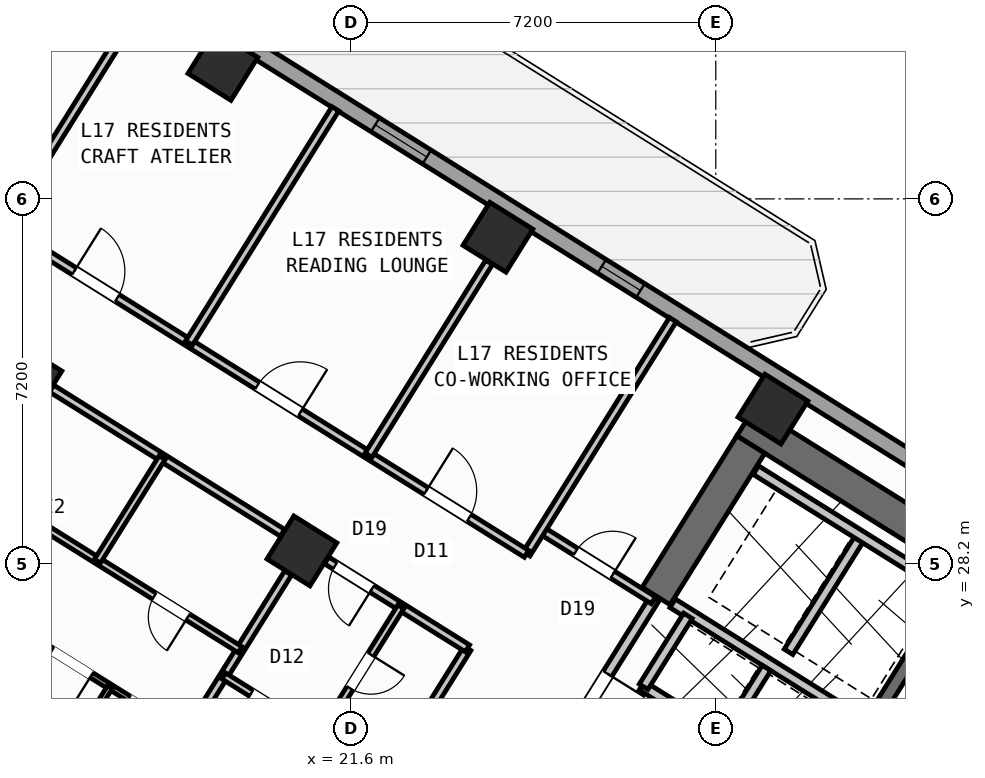
"""IFC4 building model, lengths in metres.
Left out: names, types, materials, properties, quantities, classifications, styles, units other than length and angle.
Written with IfcOpenShell. Run it as: python <this file> out.ifc"""

import sys

from ifc_helpers import new_model, si_unit, direction, frame, frame_2d, origin, origin_2d, place, context, subcontext, project, spatial, rectangle, hollow_rectangle, extrude, source, transform, mapped, element, fill, save


model = new_model("IFC4")
c1 = context("Model", 3, precision=1e-05, world=origin(), true_north=direction((0.0, 1.0)))
c2 = subcontext(c1, "Body", "Model", "MODEL_VIEW")
j1 = project(units=[si_unit("LENGTHUNIT", "METRE"), si_unit("PLANEANGLEUNIT", "RADIAN")], contexts=[c1])
p1 = place(None, origin())
s1 = spatial("IfcSite", under=j1, at=p1, CompositionType="ELEMENT")
p2 = place(p1, origin())
s2 = spatial("IfcBuilding", under=s1, at=p2, CompositionType="ELEMENT")
p3 = place(p2, frame((0.0, 0.0, 67.2)))
s3 = spatial("IfcBuildingStorey", under=s2, at=p3, CompositionType="ELEMENT", Elevation=67.2)
p4 = place(p3, frame((40.615, 23.983, 0.0), z_axis=(0.0, 0.0, 1.0), x_axis=(-0.848045953968, 0.529922692436, 0.0)))
e1 = element("IfcWall", 1, at=p4, inside=s3, PredefinedType="SHEAR", context=c2, shape_type="SweptSolid", body=[
    extrude(rectangle(XDim=13.24, YDim=0.65, at=frame_2d((6.62, 0.0))), origin(), (0.0, 0.0, 1.0), 4.22),
])
p5 = place(p3, frame((29.491, 30.552, 0.0), z_axis=(0.0, 0.0, 1.0), x_axis=(-0.529893103397, -0.8480644427, 0.0)))
e2 = element("IfcWall", 2, at=p5, inside=s3, PredefinedType="SHEAR", context=c2, shape_type="SweptSolid", body=[
    extrude(rectangle(XDim=3.525, YDim=0.65, at=frame_2d((1.763, 0.0))), origin(), (0.0, 0.0, 1.0), 4.22),
])
m1 = source(origin(), c2, "Body", "SweptSolid", [
    extrude(hollow_rectangle(XDim=1.0, YDim=1.0, WallThickness=0.04, at=origin_2d()), origin(), (0.0, 0.0, 1.0), 4.5),
])
for number, where, z_axis, x_axis in (
    (3, (29.928, 31.251, 0.0), (0.0, 0.0, 1.0), (-0.848, 0.53, 0.0)),
    (4, (24.5, 34.643, 0.0), (0.0, 0.0, 1.0), (-0.848, 0.53, 0.0)),
    (5, (20.632, 28.452, 0.0), (0.0, 0.0, 1.0), (-0.848, 0.53, 0.0)),
    (6, (19.073, 38.034, 0.0), (0.0, 0.0, 1.0), (-0.848, 0.53, 0.0)),
    (7, (15.205, 31.844, 0.0), (0.0, 0.0, 1.0), (-0.848, 0.53, 0.0)),
):
    element("IfcColumn", number, at=place(p3, frame(where, z_axis=z_axis, x_axis=x_axis)), inside=s3, PredefinedType="COLUMN", context=c2, shape_type="MappedRepresentation", body=[
        mapped(m1, transform((0.0, 0.0, 0.0), scale=1.0)),
    ])
p6 = place(p3, frame((14.138, 41.825, 0.0), z_axis=(0.0, 0.0, 1.0), x_axis=(0.848046498049, -0.529921821731, 0.0)))
e8 = element("IfcWall", 8, at=p6, inside=s3, PredefinedType="STANDARD", context=c2, shape_type="SweptSolid", body=[
    extrude(rectangle(XDim=31.588, YDim=0.32, at=frame_2d((15.794, 0.0))), origin(), (0.0, 0.0, 1.0), 4.22),
])
p7 = place(p6, frame((2.526, 0.0, 0.0)))
e9 = element("IfcOpeningElement", 9, at=p7, cuts=e8, PredefinedType="OPENING", context=c2, shape_type="SweptSolid", body=[
    extrude(rectangle(XDim=1.05, YDim=2.15, at=frame_2d((0.525, 1.075))), frame((0.0, 0.17, 0.0), z_axis=(0.0, -1.0, 0.0), x_axis=(1.0, 0.0, 0.0)), (0.0, 0.0, 1.0), 0.34),
])
p8 = place(p6, frame((9.364, 0.0, 0.95)))
e10 = element("IfcOpeningElement", 10, at=p8, cuts=e8, PredefinedType="OPENING", context=c2, shape_type="SweptSolid", body=[
    extrude(rectangle(XDim=1.2, YDim=1.4, at=frame_2d((0.6, 0.7))), frame((0.0, 0.17, 0.0), z_axis=(0.0, -1.0, 0.0), x_axis=(1.0, 0.0, 0.0)), (0.0, 0.0, 1.0), 0.34),
])
p9 = place(p6, frame((14.636, 0.0, 1.0)))
e11 = element("IfcOpeningElement", 11, at=p9, cuts=e8, PredefinedType="OPENING", context=c2, shape_type="SweptSolid", body=[
    extrude(rectangle(XDim=0.9, YDim=1.25, at=frame_2d((0.45, 0.625))), frame((0.0, 0.17, 0.0), z_axis=(0.0, -1.0, 0.0), x_axis=(1.0, 0.0, 0.0)), (0.0, 0.0, 1.0), 0.34),
])
p10 = place(p6, frame((22.306, 0.0, 0.85)))
e12 = element("IfcOpeningElement", 12, at=p10, cuts=e8, PredefinedType="OPENING", context=c2, shape_type="SweptSolid", body=[
    extrude(rectangle(XDim=1.5, YDim=1.5, at=frame_2d((0.75, 0.75))), frame((0.0, 0.17, 0.0), z_axis=(0.0, -1.0, 0.0), x_axis=(1.0, 0.0, 0.0)), (0.0, 0.0, 1.0), 0.34),
])
p11 = place(p6, frame((26.981, 0.0, 0.85)))
e13 = element("IfcOpeningElement", 13, at=p11, cuts=e8, PredefinedType="OPENING", context=c2, shape_type="SweptSolid", body=[
    extrude(rectangle(XDim=1.5, YDim=1.5, at=frame_2d((0.75, 0.75))), frame((0.0, 0.17, 0.0), z_axis=(0.0, -1.0, 0.0), x_axis=(1.0, 0.0, 0.0)), (0.0, 0.0, 1.0), 0.34),
])
p12 = place(p3, frame((33.496, 27.677, 0.0), z_axis=(0.0, 0.0, 1.0), x_axis=(-0.529908658664, -0.84805472316, 0.0)))
e14 = element("IfcWall", 14, at=p12, inside=s3, PredefinedType="SHEAR", context=c2, shape_type="SweptSolid", body=[
    extrude(rectangle(XDim=3.16, YDim=0.26, at=frame_2d((1.58, 0.0))), origin(), (0.0, 0.0, 1.0), 4.22),
])
p13 = place(p3, frame((31.822, 24.998, 0.0), z_axis=(0.0, 0.0, 1.0), x_axis=(-0.848058348634, 0.529902856485, 0.0)))
e15 = element("IfcWall", 15, at=p13, inside=s3, PredefinedType="STANDARD", context=c2, shape_type="SweptSolid", body=[
    extrude(rectangle(XDim=4.568, YDim=0.2, at=frame_2d((2.284, 0.0))), origin(), (0.0, 0.0, 1.0), 4.21),
])
p14 = place(p3, frame((32.108, 22.814, 0.0), z_axis=(0.0, 0.0, 1.0), x_axis=(-0.848042229521, 0.529928652696, 0.0)))
e16 = element("IfcWall", 16, at=p14, inside=s3, PredefinedType="STANDARD", context=c2, shape_type="SweptSolid", body=[
    extrude(rectangle(XDim=5.62, YDim=0.2, at=frame_2d((2.81, 0.0))), origin(), (0.0, 0.0, 1.0), 4.21),
])
p15 = place(p3, frame((28.25, 27.17, 0.0), z_axis=(0.0, 0.0, 1.0), x_axis=(-0.529905827651, -0.848056492117, 0.0)))
e17 = element("IfcWall", 17, at=p15, inside=s3, PredefinedType="STANDARD", context=c2, shape_type="SweptSolid", body=[
    extrude(rectangle(XDim=1.65, YDim=0.2, at=frame_2d((0.825, 0.0))), origin(), (0.0, 0.0, 1.0), 4.21),
])
p16 = place(p3, frame((31.645, 28.716, 0.0), z_axis=(0.0, 0.0, 1.0), x_axis=(-0.52986693015, -0.848080795876, 0.0)))
e18 = element("IfcWall", 18, at=p16, inside=s3, PredefinedType="STANDARD", context=c2, shape_type="SweptSolid", body=[
    extrude(rectangle(XDim=2.66, YDim=0.2, at=frame_2d((1.33, 0.0))), origin(), (0.0, 0.0, 1.0), 4.21),
])
p17 = place(p3, frame((33.363, 27.69, 0.0), z_axis=(0.0, 0.0, 1.0), x_axis=(-0.848053806312, 0.529910125964, 0.0)))
e19 = element("IfcWall", 19, at=p17, inside=s3, PredefinedType="STANDARD", context=c2, shape_type="SweptSolid", body=[
    extrude(rectangle(XDim=4.448, YDim=0.2, at=frame_2d((2.224, 0.0))), origin(), (0.0, 0.0, 1.0), 4.21),
])
p18 = place(p3, frame((29.801, 26.142, 0.0), z_axis=(0.0, 0.0, 1.0), x_axis=(-0.529998940003, -0.847998304005, 0.0)))
e20 = element("IfcWall", 20, at=p18, inside=s3, PredefinedType="STANDARD", context=c2, shape_type="SweptSolid", body=[
    extrude(rectangle(XDim=1.58, YDim=0.2, at=frame_2d((0.79, 0.0))), origin(), (0.0, 0.0, 1.0), 4.21),
])
p19 = place(p3, frame((27.596, 27.52, 0.0), z_axis=(0.0, 0.0, 1.0), x_axis=(-0.529865479138, -0.848081702443, 0.0)))
e21 = element("IfcWall", 21, at=p19, inside=s3, PredefinedType="STANDARD", context=c2, shape_type="SweptSolid", body=[
    extrude(rectangle(XDim=2.96, YDim=0.2, at=frame_2d((1.48, 0.0))), origin(), (0.0, 0.0, 1.0), 2.395),
])
p20 = place(p19, frame((1.76, 0.0, 0.0)))
e22 = element("IfcOpeningElement", 22, at=p20, cuts=e21, PredefinedType="OPENING", context=c2, shape_type="SweptSolid", body=[
    extrude(rectangle(XDim=0.86, YDim=2.05, at=frame_2d((0.43, 1.025))), frame((0.0, 0.11, 0.0), z_axis=(0.0, -1.0, 0.0), x_axis=(1.0, 0.0, 0.0)), (0.0, 0.0, 1.0), 0.22),
])
p21 = place(p3, frame((27.57, 27.478, 0.0), z_axis=(0.0, 0.0, 1.0), x_axis=(-0.848050851465, 0.529914854792, 0.0)))
e23 = element("IfcWall", 23, at=p21, inside=s3, PredefinedType="PARTITIONING", context=c2, shape_type="SweptSolid", body=[
    extrude(rectangle(XDim=2.61, YDim=0.16, at=frame_2d((1.305, 0.0))), origin(), (0.0, 0.0, 1.0), 4.21),
])
p22 = place(p21, frame((0.95, 0.0, 0.0)))
e24 = element("IfcOpeningElement", 24, at=p22, cuts=e23, PredefinedType="OPENING", context=c2, shape_type="SweptSolid", body=[
    extrude(rectangle(XDim=0.86, YDim=2.05, at=frame_2d((0.43, 1.025))), frame((0.0, 0.09, 0.0), z_axis=(0.0, -1.0, 0.0), x_axis=(1.0, 0.0, 0.0)), (0.0, 0.0, 1.0), 0.18),
])
p23 = place(p3, frame((27.953, 33.016, 0.0), z_axis=(0.0, 0.0, 1.0), x_axis=(-0.529906322364, -0.848056182997, 0.0)))
e25 = element("IfcWall", 25, at=p23, inside=s3, PredefinedType="PARTITIONING", context=c2, shape_type="SweptSolid", body=[
    extrude(rectangle(XDim=5.45, YDim=0.16, at=frame_2d((2.725, 0.0))), origin(), (0.0, 0.0, 1.0), 4.21),
])
p24 = place(p3, frame((23.899, 26.529, 0.0), z_axis=(0.0, 0.0, 1.0), x_axis=(-0.529917716469, -0.848049063305, 0.0)))
e26 = element("IfcWall", 26, at=p24, inside=s3, PredefinedType="PARTITIONING", context=c2, shape_type="SweptSolid", body=[
    extrude(rectangle(XDim=14.05, YDim=0.16, at=frame_2d((7.025, 0.0))), origin(), (0.0, 0.0, 1.0), 4.21),
])
p25 = place(p3, frame((25.065, 28.394, 0.0), z_axis=(0.0, 0.0, 1.0), x_axis=(-0.848048310262, 0.529918921593, 0.0)))
e27 = element("IfcWall", 27, at=p25, inside=s3, PredefinedType="PARTITIONING", context=c2, shape_type="SweptSolid", body=[
    extrude(rectangle(XDim=16.73, YDim=0.16, at=frame_2d((8.365, 0.0))), origin(), (0.0, 0.0, 1.0), 4.21),
])
p26 = place(p25, frame((1.338, 0.0, 0.0)))
e28 = element("IfcOpeningElement", 28, at=p26, cuts=e27, PredefinedType="OPENING", context=c2, shape_type="SweptSolid", body=[
    extrude(rectangle(XDim=1.0, YDim=2.1, at=frame_2d((0.5, 1.05))), frame((0.0, 0.09, 0.0), z_axis=(0.0, -1.0, 0.0), x_axis=(1.0, 0.0, 0.0)), (0.0, 0.0, 1.0), 0.18),
])
p27 = place(p25, frame((5.265, 0.0, 0.0)))
e29 = element("IfcOpeningElement", 29, at=p27, cuts=e27, PredefinedType="OPENING", context=c2, shape_type="SweptSolid", body=[
    extrude(rectangle(XDim=1.0, YDim=2.1, at=frame_2d((0.5, 1.05))), frame((0.0, 0.09, 0.0), z_axis=(0.0, -1.0, 0.0), x_axis=(1.0, 0.0, 0.0)), (0.0, 0.0, 1.0), 0.18),
])
p28 = place(p25, frame((9.526, 0.0, 0.0)))
e30 = element("IfcOpeningElement", 30, at=p28, cuts=e27, PredefinedType="OPENING", context=c2, shape_type="SweptSolid", body=[
    extrude(rectangle(XDim=1.0, YDim=2.1, at=frame_2d((0.5, 1.05))), frame((0.0, 0.09, 0.0), z_axis=(0.0, -1.0, 0.0), x_axis=(1.0, 0.0, 0.0)), (0.0, 0.0, 1.0), 0.18),
])
p29 = place(p25, frame((13.954, 0.0, 0.0)))
e31 = element("IfcOpeningElement", 31, at=p29, cuts=e27, PredefinedType="OPENING", context=c2, shape_type="SweptSolid", body=[
    extrude(rectangle(XDim=1.0, YDim=2.1, at=frame_2d((0.5, 1.05))), frame((0.0, 0.09, 0.0), z_axis=(0.0, -1.0, 0.0), x_axis=(1.0, 0.0, 0.0)), (0.0, 0.0, 1.0), 0.18),
])
p30 = place(p3, frame((23.899, 26.529, 0.0), z_axis=(0.0, 0.0, 1.0), x_axis=(-0.848061058944, 0.529898518871, 0.0)))
e32 = element("IfcWall", 32, at=p30, inside=s3, PredefinedType="PARTITIONING", context=c2, shape_type="SweptSolid", body=[
    extrude(rectangle(XDim=3.278, YDim=0.16, at=frame_2d((1.639, 0.0))), origin(), (0.0, 0.0, 1.0), 3.595),
])
p31 = place(p30, frame((2.22, 0.0, 0.0)))
e33 = element("IfcOpeningElement", 33, at=p31, cuts=e32, PredefinedType="OPENING", context=c2, shape_type="SweptSolid", body=[
    extrude(rectangle(XDim=0.86, YDim=2.05, at=frame_2d((0.43, 1.025))), frame((0.0, 0.09, 0.0), z_axis=(0.0, -1.0, 0.0), x_axis=(1.0, 0.0, 0.0)), (0.0, 0.0, 1.0), 0.18),
])
p32 = place(p3, frame((20.251, 28.808, 0.0), z_axis=(0.0, 0.0, 1.0), x_axis=(-0.848044224181, 0.529925460639, 0.0)))
e34 = element("IfcWall", 34, at=p32, inside=s3, PredefinedType="PARTITIONING", context=c2, shape_type="SweptSolid", body=[
    extrude(rectangle(XDim=5.376, YDim=0.16, at=frame_2d((2.688, 0.0))), origin(), (0.0, 0.0, 1.0), 3.595),
])
p33 = place(p3, frame((20.361, 28.018, 0.0), z_axis=(0.0, 0.0, 1.0), x_axis=(-0.529915015264, -0.848050751193, 0.0)))
e35 = element("IfcWall", 35, at=p33, inside=s3, PredefinedType="PARTITIONING", context=c2, shape_type="SweptSolid", body=[
    extrude(rectangle(XDim=6.276, YDim=0.16, at=frame_2d((3.138, 0.0))), origin(), (0.0, 0.0, 1.0), 2.395),
])
p34 = place(p3, frame((22.304, 23.976, 0.0), z_axis=(0.0, 0.0, 1.0), x_axis=(-0.84803087207, 0.529946827537, 0.0)))
e36 = element("IfcWall", 36, at=p34, inside=s3, PredefinedType="PLUMBINGWALL", context=c2, shape_type="SweptSolid", body=[
    extrude(rectangle(XDim=3.79, YDim=0.14, at=frame_2d((1.895, 0.0))), origin(), (0.0, 0.0, 1.0), 4.21),
])
p35 = place(p34, frame((2.23, 0.0, 0.0)))
e37 = element("IfcOpeningElement", 37, at=p35, cuts=e36, PredefinedType="OPENING", context=c2, shape_type="SweptSolid", body=[
    extrude(rectangle(XDim=0.92, YDim=2.08, at=frame_2d((0.46, 1.04))), frame((0.0, 0.08, 0.0), z_axis=(0.0, -1.0, 0.0), x_axis=(1.0, 0.0, 0.0)), (0.0, 0.0, 1.0), 0.16),
])
p36 = place(p3, frame((22.585, 27.35, 0.0), z_axis=(0.0, 0.0, 1.0), x_axis=(-0.529977067289, -0.848011974059, 0.0)))
e38 = element("IfcWall", 38, at=p36, inside=s3, PredefinedType="PLUMBINGWALL", context=c2, shape_type="SweptSolid", body=[
    extrude(rectangle(XDim=3.01, YDim=0.14, at=frame_2d((1.505, 0.0))), origin(), (0.0, 0.0, 1.0), 3.865),
])
p37 = place(p36, frame((1.115, 0.0, 0.0)))
e39 = element("IfcOpeningElement", 39, at=p37, cuts=e38, PredefinedType="OPENING", context=c2, shape_type="SweptSolid", body=[
    extrude(rectangle(XDim=0.78, YDim=2.05, at=frame_2d((0.39, 1.025))), frame((0.0, 0.08, 0.0), z_axis=(0.0, -1.0, 0.0), x_axis=(1.0, 0.0, 0.0)), (0.0, 0.0, 1.0), 0.16),
])
p38 = place(p3, frame((19.413, 26.501, 0.0), z_axis=(0.0, 0.0, 1.0), x_axis=(-0.848051995289, 0.529913024266, 0.0)))
e40 = element("IfcWall", 40, at=p38, inside=s3, PredefinedType="PLUMBINGWALL", context=c2, shape_type="SweptSolid", body=[
    extrude(rectangle(XDim=8.94, YDim=0.14, at=frame_2d((4.47, 0.0))), origin(), (0.0, 0.0, 1.0), 4.21),
])
p39 = place(p38, frame((5.688, 0.0, 0.0)))
e41 = element("IfcOpeningElement", 41, at=p39, cuts=e40, PredefinedType="OPENING", context=c2, shape_type="SweptSolid", body=[
    extrude(rectangle(XDim=0.78, YDim=2.05, at=frame_2d((0.39, 1.025))), frame((0.0, 0.08, 0.0), z_axis=(0.0, -1.0, 0.0), x_axis=(1.0, 0.0, 0.0)), (0.0, 0.0, 1.0), 0.16),
])
p40 = place(p38, frame((1.218, 0.0, 0.0)))
e42 = element("IfcOpeningElement", 42, at=p40, cuts=e40, PredefinedType="OPENING", context=c2, shape_type="SweptSolid", body=[
    extrude(rectangle(XDim=0.78, YDim=2.05, at=frame_2d((0.39, 1.025))), frame((0.0, 0.08, 0.0), z_axis=(0.0, -1.0, 0.0), x_axis=(1.0, 0.0, 0.0)), (0.0, 0.0, 1.0), 0.16),
])
p41 = place(p3, frame((17.874, 30.294, 0.0), z_axis=(0.0, 0.0, 1.0), x_axis=(-0.52988967038, -0.848066587731, 0.0)))
e43 = element("IfcWall", 43, at=p41, inside=s3, PredefinedType="PLUMBINGWALL", context=c2, shape_type="SweptSolid", body=[
    extrude(rectangle(XDim=2.41, YDim=0.14, at=frame_2d((1.205, 0.0))), origin(), (0.0, 0.0, 1.0), 4.21),
])
p42 = place(p3, frame((18.364, 24.823, 0.0), z_axis=(0.0, 0.0, 1.0), x_axis=(-0.848056599187, 0.529905656296, 0.0)))
e44 = element("IfcWall", 44, at=p42, inside=s3, PredefinedType="PARTITIONING", context=c2, shape_type="SweptSolid", body=[
    extrude(rectangle(XDim=8.94, YDim=0.11, at=frame_2d((4.47, 0.0))), origin(), (0.0, 0.0, 1.0), 4.21),
])
p43 = place(p42, frame((0.434, 0.0, 0.0)))
e45 = element("IfcOpeningElement", 45, at=p43, cuts=e44, PredefinedType="OPENING", context=c2, shape_type="SweptSolid", body=[
    extrude(rectangle(XDim=0.92, YDim=2.08, at=frame_2d((0.46, 1.04))), frame((0.0, 0.065, 0.0), z_axis=(0.0, -1.0, 0.0), x_axis=(1.0, 0.0, 0.0)), (0.0, 0.0, 1.0), 0.13),
])
p44 = place(p42, frame((2.222, 0.0, 0.0)))
e46 = element("IfcOpeningElement", 46, at=p44, cuts=e44, PredefinedType="OPENING", context=c2, shape_type="SweptSolid", body=[
    extrude(rectangle(XDim=0.92, YDim=2.08, at=frame_2d((0.46, 1.04))), frame((0.0, 0.065, 0.0), z_axis=(0.0, -1.0, 0.0), x_axis=(1.0, 0.0, 0.0)), (0.0, 0.0, 1.0), 0.13),
])
p45 = place(p42, frame((4.01, 0.0, 0.0)))
e47 = element("IfcOpeningElement", 47, at=p45, cuts=e44, PredefinedType="OPENING", context=c2, shape_type="SweptSolid", body=[
    extrude(rectangle(XDim=0.92, YDim=2.08, at=frame_2d((0.46, 1.04))), frame((0.0, 0.065, 0.0), z_axis=(0.0, -1.0, 0.0), x_axis=(1.0, 0.0, 0.0)), (0.0, 0.0, 1.0), 0.13),
])
p46 = place(p42, frame((5.798, 0.0, 0.0)))
e48 = element("IfcOpeningElement", 48, at=p46, cuts=e44, PredefinedType="OPENING", context=c2, shape_type="SweptSolid", body=[
    extrude(rectangle(XDim=0.92, YDim=2.08, at=frame_2d((0.46, 1.04))), frame((0.0, 0.065, 0.0), z_axis=(0.0, -1.0, 0.0), x_axis=(1.0, 0.0, 0.0)), (0.0, 0.0, 1.0), 0.13),
])
p47 = place(p42, frame((7.586, 0.0, 0.0)))
e49 = element("IfcOpeningElement", 49, at=p47, cuts=e44, PredefinedType="OPENING", context=c2, shape_type="SweptSolid", body=[
    extrude(rectangle(XDim=0.92, YDim=2.08, at=frame_2d((0.46, 1.04))), frame((0.0, 0.065, 0.0), z_axis=(0.0, -1.0, 0.0), x_axis=(1.0, 0.0, 0.0)), (0.0, 0.0, 1.0), 0.13),
])
p48 = place(p3, frame((16.848, 25.77, 0.0), z_axis=(0.0, 0.0, 1.0), x_axis=(-0.529910626741, -0.8480534934, 0.0)))
e50 = element("IfcWall", 50, at=p48, inside=s3, PredefinedType="PARTITIONING", context=c2, shape_type="SweptSolid", body=[
    extrude(rectangle(XDim=9.94, YDim=0.11, at=frame_2d((4.97, 0.0))), origin(), (0.0, 0.0, 1.0), 4.21),
])
p49 = place(p3, frame((24.326, 34.148, 0.0), z_axis=(0.0, 0.0, 1.0), x_axis=(-0.529915808518, -0.848050255517, 0.0)))
e51 = element("IfcWall", 51, at=p49, inside=s3, PredefinedType="PARTITIONING", context=c2, shape_type="SweptSolid", body=[
    extrude(rectangle(XDim=4.488, YDim=0.16, at=frame_2d((2.244, 0.0))), origin(), (0.0, 0.0, 1.0), 2.395),
])
for number, where, z_axis, x_axis in (
    (52, (21.292, 37.178, 0.0), (0.0, 0.0, 1.0), (-0.53, -0.848, 0.0)),
    (53, (17.608, 39.48, 0.0), (0.0, 0.0, 1.0), (-0.53, -0.848, 0.0)),
):
    element("IfcWall", number, at=place(p3, frame(where, z_axis=z_axis, x_axis=x_axis)), inside=s3, PredefinedType="PARTITIONING", context=c2, shape_type="SweptSolid", body=[
        extrude(rectangle(XDim=5.45, YDim=0.16, at=frame_2d((2.725, 0.0))), origin(), (0.0, 0.0, 1.0), 3.865),
    ])
m2 = source(origin(), c2, "Body", "SweptSolid", [
    extrude(rectangle(XDim=1.2, YDim=1.4, at=frame_2d((0.6, 0.7))), frame((0.0, 0.03, 0.0), z_axis=(0.0, -1.0, 0.0), x_axis=(1.0, 0.0, 0.0)), (0.0, 0.0, 1.0), 0.06),
])
p50 = place(p8, origin())
e54 = element("IfcWindow", 54, at=p50, inside=s3, PartitioningType="SINGLE_PANEL", PredefinedType="WINDOW", context=c2, shape_type="MappedRepresentation", body=[
    mapped(m2, transform((0.0, 0.0, 0.0), scale=1.0)),
])
fill(e10, e54)
m3 = source(origin(), c2, "Body", "SweptSolid", [
    extrude(rectangle(XDim=0.9, YDim=1.25, at=frame_2d((0.45, 0.625))), frame((0.0, 0.03, 0.0), z_axis=(0.0, -1.0, 0.0), x_axis=(1.0, 0.0, 0.0)), (0.0, 0.0, 1.0), 0.06),
])
p51 = place(p9, origin())
e55 = element("IfcWindow", 55, at=p51, inside=s3, PartitioningType="SINGLE_PANEL", PredefinedType="WINDOW", context=c2, shape_type="MappedRepresentation", body=[
    mapped(m3, transform((0.0, 0.0, 0.0), scale=1.0)),
])
fill(e11, e55)
m4 = source(origin(), c2, "Body", "SweptSolid", [
    extrude(rectangle(XDim=0.86, YDim=2.05, at=frame_2d((0.43, 1.025))), frame((0.0, 0.025, 0.0), z_axis=(0.0, -1.0, 0.0), x_axis=(1.0, 0.0, 0.0)), (0.0, 0.0, 1.0), 0.05),
])
p52 = place(p22, frame((0.86, 0.0, 0.0), z_axis=(0.0, 0.0, 1.0), x_axis=(-1.0, 0.0, 0.0)))
e56 = element("IfcDoor", 56, at=p52, inside=s3, OperationType="SINGLE_SWING_RIGHT", PredefinedType="DOOR", context=c2, shape_type="MappedRepresentation", body=[
    mapped(m4, transform((0.0, 0.0, 0.0), scale=1.0)),
])
fill(e24, e56)
p53 = place(p20, origin())
e57 = element("IfcDoor", 57, at=p53, inside=s3, OperationType="SINGLE_SWING_LEFT", PredefinedType="DOOR", context=c2, shape_type="MappedRepresentation", body=[
    mapped(m4, transform((0.0, 0.0, 0.0), scale=1.0)),
])
fill(e22, e57)
p54 = place(p31, origin())
e58 = element("IfcDoor", 58, at=p54, inside=s3, OperationType="SINGLE_SWING_LEFT", PredefinedType="DOOR", context=c2, shape_type="MappedRepresentation", body=[
    mapped(m4, transform((0.0, 0.0, 0.0), scale=1.0)),
])
fill(e33, e58)
m5 = source(origin(), c2, "Body", "SweptSolid", [
    extrude(rectangle(XDim=0.92, YDim=2.08, at=frame_2d((0.46, 1.04))), frame((0.0, 0.025, 0.0), z_axis=(0.0, -1.0, 0.0), x_axis=(1.0, 0.0, 0.0)), (0.0, 0.0, 1.0), 0.05),
])
p55 = place(p35, origin())
e59 = element("IfcDoor", 59, at=p55, inside=s3, OperationType="SINGLE_SWING_RIGHT", PredefinedType="DOOR", context=c2, shape_type="MappedRepresentation", body=[
    mapped(m5, transform((0.0, 0.0, 0.0), scale=1.0)),
])
fill(e37, e59)
m6 = source(origin(), c2, "Body", "SweptSolid", [
    extrude(rectangle(XDim=0.78, YDim=2.05, at=frame_2d((0.39, 1.025))), frame((0.0, 0.025, 0.0), z_axis=(0.0, -1.0, 0.0), x_axis=(1.0, 0.0, 0.0)), (0.0, 0.0, 1.0), 0.05),
])
p56 = place(p37, origin())
e60 = element("IfcDoor", 60, at=p56, inside=s3, OperationType="SINGLE_SWING_LEFT", PredefinedType="DOOR", context=c2, shape_type="MappedRepresentation", body=[
    mapped(m6, transform((0.0, 0.0, 0.0), scale=1.0)),
])
fill(e39, e60)
p57 = place(p40, origin())
e61 = element("IfcDoor", 61, at=p57, inside=s3, OperationType="SINGLE_SWING_LEFT", PredefinedType="DOOR", context=c2, shape_type="MappedRepresentation", body=[
    mapped(m6, transform((0.0, 0.0, 0.0), scale=1.0)),
])
fill(e42, e61)
p58 = place(p43, origin())
e62 = element("IfcDoor", 62, at=p58, inside=s3, OperationType="SINGLE_SWING_RIGHT", PredefinedType="DOOR", context=c2, shape_type="MappedRepresentation", body=[
    mapped(m5, transform((0.0, 0.0, 0.0), scale=1.0)),
])
fill(e45, e62)
p59 = place(p44, origin())
e63 = element("IfcDoor", 63, at=p59, inside=s3, OperationType="SINGLE_SWING_LEFT", PredefinedType="DOOR", context=c2, shape_type="MappedRepresentation", body=[
    mapped(m5, transform((0.0, 0.0, 0.0), scale=1.0)),
])
fill(e46, e63)
m7 = source(origin(), c2, "Body", "SweptSolid", [
    extrude(rectangle(XDim=1.0, YDim=2.1, at=frame_2d((0.5, 1.05))), frame((0.0, 0.025, 0.0), z_axis=(0.0, -1.0, 0.0), x_axis=(1.0, 0.0, 0.0)), (0.0, 0.0, 1.0), 0.05),
])
p60 = place(p26, frame((1.0, 0.0, 0.0), z_axis=(0.0, 0.0, 1.0), x_axis=(-1.0, 0.0, 0.0)))
e64 = element("IfcDoor", 64, at=p60, inside=s3, OperationType="SINGLE_SWING_LEFT", PredefinedType="DOOR", context=c2, shape_type="MappedRepresentation", body=[
    mapped(m7, transform((0.0, 0.0, 0.0), scale=1.0)),
])
fill(e28, e64)
p61 = place(p27, frame((1.0, 0.0, 0.0), z_axis=(0.0, 0.0, 1.0), x_axis=(-1.0, 0.0, 0.0)))
e65 = element("IfcDoor", 65, at=p61, inside=s3, OperationType="SINGLE_SWING_RIGHT", PredefinedType="DOOR", context=c2, shape_type="MappedRepresentation", body=[
    mapped(m7, transform((0.0, 0.0, 0.0), scale=1.0)),
])
fill(e29, e65)
p62 = place(p28, frame((1.0, 0.0, 0.0), z_axis=(0.0, 0.0, 1.0), x_axis=(-1.0, 0.0, 0.0)))
e66 = element("IfcDoor", 66, at=p62, inside=s3, OperationType="SINGLE_SWING_LEFT", PredefinedType="DOOR", context=c2, shape_type="MappedRepresentation", body=[
    mapped(m7, transform((0.0, 0.0, 0.0), scale=1.0)),
])
fill(e30, e66)
save(model, sys.argv[1])
